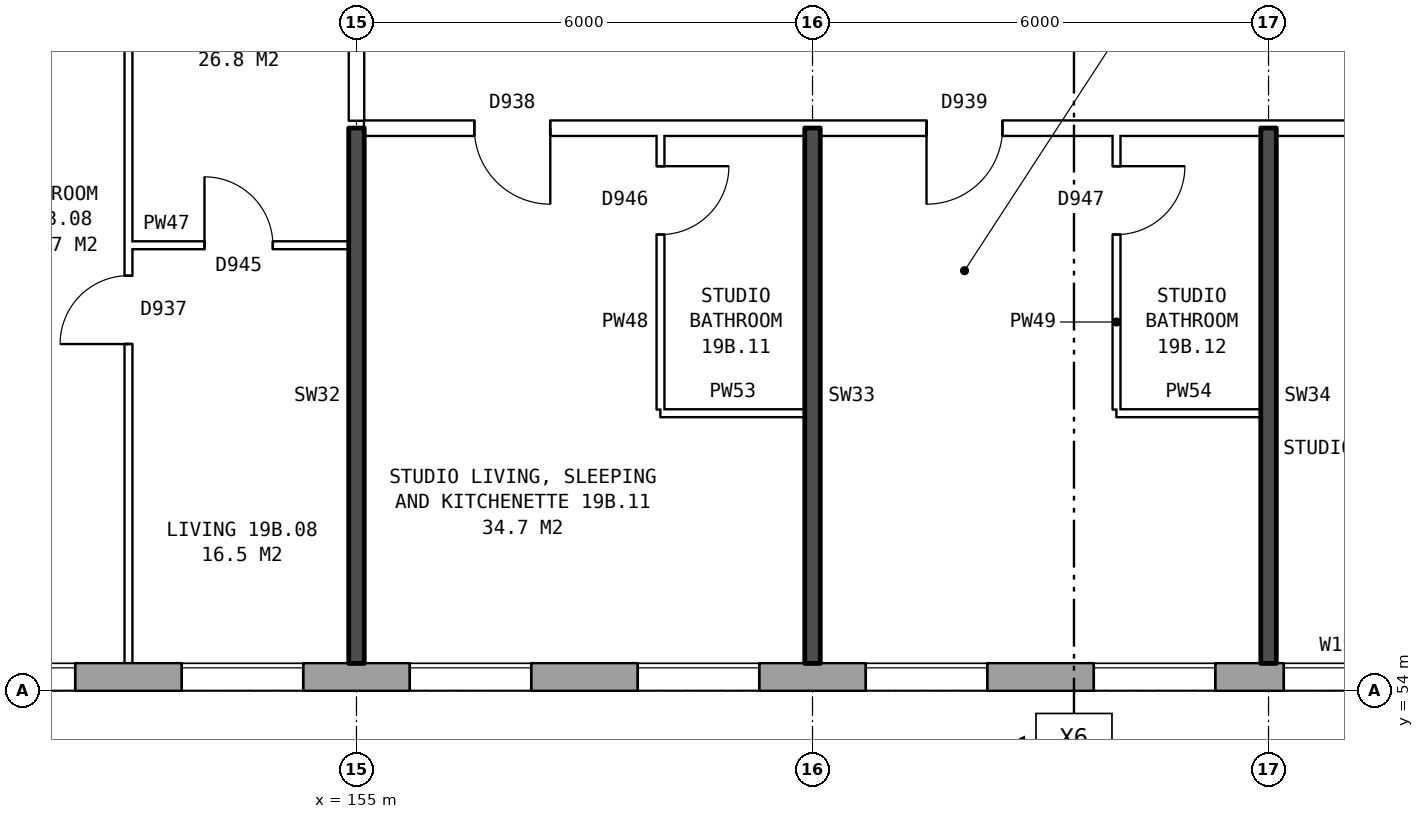
"""IFC4 building model, lengths in metres.
Left out: names, types, materials, properties, quantities, classifications, styles, units other than length and angle.
Written with IfcOpenShell. Run it as: python <this file> out.ifc"""

import sys

from ifc_helpers import new_model, si_unit, direction, frame, frame_2d, origin, place, context, subcontext, project, spatial, rectangle, extrude, element, fill, save


model = new_model("IFC4")
c1 = context("Model", 3, precision=1e-05, world=origin(), true_north=direction((0.0, 1.0)))
c2 = subcontext(c1, "Body", "Model", "MODEL_VIEW")
j1 = project(units=[si_unit("LENGTHUNIT", "METRE"), si_unit("PLANEANGLEUNIT", "RADIAN")], contexts=[c1])
p1 = place(None, origin())
s1 = spatial("IfcSite", under=j1, at=p1, CompositionType="ELEMENT")
p2 = place(p1, origin())
s2 = spatial("IfcBuilding", under=s1, at=p2, CompositionType="ELEMENT")
p3 = place(p2, frame((0.0, 0.0, 71.6)))
s3 = spatial("IfcBuildingStorey", under=s2, at=p3, CompositionType="ELEMENT", Elevation=71.6)
p4 = place(p3, frame((134.075, 54.18, 0.0), z_axis=(0.0, 0.0, 1.0), x_axis=(1.0, 0.0, 0.0)))
e1 = element("IfcWall", 1, at=p4, inside=s3, PredefinedType="STANDARD", context=c2, shape_type="SweptSolid", body=[
    extrude(rectangle(XDim=38.101, YDim=0.36, at=frame_2d((19.05, 0.0))), origin(), (0.0, 0.0, 1.0), 2.85),
])
p5 = place(p4, frame((0.3, 0.0, 0.8)))
e2 = element("IfcOpeningElement", 2, at=p5, cuts=e1, PredefinedType="OPENING", context=c2, shape_type="SweptSolid", body=[
    extrude(rectangle(XDim=1.0, YDim=1.8, at=frame_2d((0.5, 0.9))), frame((0.0, 0.19, 0.0), z_axis=(0.0, -1.0, 0.0), x_axis=(1.0, 0.0, 0.0)), (0.0, 0.0, 1.0), 0.38),
])
p6 = place(p4, frame((3.525, 0.0, 0.8)))
e3 = element("IfcOpeningElement", 3, at=p6, cuts=e1, PredefinedType="OPENING", context=c2, shape_type="SweptSolid", body=[
    extrude(rectangle(XDim=0.8, YDim=0.9, at=frame_2d((0.4, 0.45))), frame((0.0, 0.19, 0.0), z_axis=(0.0, -1.0, 0.0), x_axis=(1.0, 0.0, 0.0)), (0.0, 0.0, 1.0), 0.38),
])
p7 = place(p4, frame((6.625, 0.0, 0.8)))
e4 = element("IfcOpeningElement", 4, at=p7, cuts=e1, PredefinedType="OPENING", context=c2, shape_type="SweptSolid", body=[
    extrude(rectangle(XDim=1.6, YDim=1.8, at=frame_2d((0.8, 0.9))), frame((0.0, 0.19, 0.0), z_axis=(0.0, -1.0, 0.0), x_axis=(1.0, 0.0, 0.0)), (0.0, 0.0, 1.0), 0.38),
])
p8 = place(p4, frame((9.625, 0.0, 0.8)))
e5 = element("IfcOpeningElement", 5, at=p8, cuts=e1, PredefinedType="OPENING", context=c2, shape_type="SweptSolid", body=[
    extrude(rectangle(XDim=1.6, YDim=1.8, at=frame_2d((0.8, 0.9))), frame((0.0, 0.19, 0.0), z_axis=(0.0, -1.0, 0.0), x_axis=(1.0, 0.0, 0.0)), (0.0, 0.0, 1.0), 0.38),
])
p9 = place(p4, frame((12.625, 0.0, 0.8)))
e6 = element("IfcOpeningElement", 6, at=p9, cuts=e1, PredefinedType="OPENING", context=c2, shape_type="SweptSolid", body=[
    extrude(rectangle(XDim=1.6, YDim=1.8, at=frame_2d((0.8, 0.9))), frame((0.0, 0.19, 0.0), z_axis=(0.0, -1.0, 0.0), x_axis=(1.0, 0.0, 0.0)), (0.0, 0.0, 1.0), 0.38),
])
p10 = place(p4, frame((15.625, 0.0, 0.8)))
e7 = element("IfcOpeningElement", 7, at=p10, cuts=e1, PredefinedType="OPENING", context=c2, shape_type="SweptSolid", body=[
    extrude(rectangle(XDim=1.6, YDim=1.8, at=frame_2d((0.8, 0.9))), frame((0.0, 0.19, 0.0), z_axis=(0.0, -1.0, 0.0), x_axis=(1.0, 0.0, 0.0)), (0.0, 0.0, 1.0), 0.38),
])
p11 = place(p4, frame((18.625, 0.0, 0.8)))
e8 = element("IfcOpeningElement", 8, at=p11, cuts=e1, PredefinedType="OPENING", context=c2, shape_type="SweptSolid", body=[
    extrude(rectangle(XDim=1.6, YDim=1.8, at=frame_2d((0.8, 0.9))), frame((0.0, 0.19, 0.0), z_axis=(0.0, -1.0, 0.0), x_axis=(1.0, 0.0, 0.0)), (0.0, 0.0, 1.0), 0.38),
])
p12 = place(p4, frame((21.625, 0.0, 0.8)))
e9 = element("IfcOpeningElement", 9, at=p12, cuts=e1, PredefinedType="OPENING", context=c2, shape_type="SweptSolid", body=[
    extrude(rectangle(XDim=1.6, YDim=1.8, at=frame_2d((0.8, 0.9))), frame((0.0, 0.19, 0.0), z_axis=(0.0, -1.0, 0.0), x_axis=(1.0, 0.0, 0.0)), (0.0, 0.0, 1.0), 0.38),
])
p13 = place(p4, frame((24.625, 0.0, 0.8)))
e10 = element("IfcOpeningElement", 10, at=p13, cuts=e1, PredefinedType="OPENING", context=c2, shape_type="SweptSolid", body=[
    extrude(rectangle(XDim=1.6, YDim=1.8, at=frame_2d((0.8, 0.9))), frame((0.0, 0.19, 0.0), z_axis=(0.0, -1.0, 0.0), x_axis=(1.0, 0.0, 0.0)), (0.0, 0.0, 1.0), 0.38),
])
p14 = place(p4, frame((27.625, 0.0, 0.8)))
e11 = element("IfcOpeningElement", 11, at=p14, cuts=e1, PredefinedType="OPENING", context=c2, shape_type="SweptSolid", body=[
    extrude(rectangle(XDim=1.6, YDim=1.8, at=frame_2d((0.8, 0.9))), frame((0.0, 0.19, 0.0), z_axis=(0.0, -1.0, 0.0), x_axis=(1.0, 0.0, 0.0)), (0.0, 0.0, 1.0), 0.38),
])
p15 = place(p4, frame((30.625, 0.0, 0.8)))
e12 = element("IfcOpeningElement", 12, at=p15, cuts=e1, PredefinedType="OPENING", context=c2, shape_type="SweptSolid", body=[
    extrude(rectangle(XDim=1.6, YDim=1.8, at=frame_2d((0.8, 0.9))), frame((0.0, 0.19, 0.0), z_axis=(0.0, -1.0, 0.0), x_axis=(1.0, 0.0, 0.0)), (0.0, 0.0, 1.0), 0.38),
])
p16 = place(p4, frame((33.125, 0.0, 0.8)))
e13 = element("IfcOpeningElement", 13, at=p16, cuts=e1, PredefinedType="OPENING", context=c2, shape_type="SweptSolid", body=[
    extrude(rectangle(XDim=1.4, YDim=0.9, at=frame_2d((0.7, 0.45))), frame((0.0, 0.19, 0.0), z_axis=(0.0, -1.0, 0.0), x_axis=(1.0, 0.0, 0.0)), (0.0, 0.0, 1.0), 0.38),
])
p17 = place(p4, frame((1.6, 0.0, 1.6)))
e14 = element("IfcOpeningElement", 14, at=p17, cuts=e1, PredefinedType="OPENING", context=c2, shape_type="SweptSolid", body=[
    extrude(rectangle(XDim=0.6, YDim=0.9, at=frame_2d((0.3, 0.45))), frame((0.0, 0.19, 0.0), z_axis=(0.0, -1.0, 0.0), x_axis=(1.0, 0.0, 0.0)), (0.0, 0.0, 1.0), 0.38),
])
p18 = place(p4, frame((4.625, 0.0, 0.8)))
e15 = element("IfcOpeningElement", 15, at=p18, cuts=e1, PredefinedType="OPENING", context=c2, shape_type="SweptSolid", body=[
    extrude(rectangle(XDim=1.6, YDim=1.8, at=frame_2d((0.8, 0.9))), frame((0.0, 0.19, 0.0), z_axis=(0.0, -1.0, 0.0), x_axis=(1.0, 0.0, 0.0)), (0.0, 0.0, 1.0), 0.38),
])
p19 = place(p4, frame((35.775, 0.0, 1.7)))
e16 = element("IfcOpeningElement", 16, at=p19, cuts=e1, PredefinedType="OPENING", context=c2, shape_type="SweptSolid", body=[
    extrude(rectangle(XDim=0.6, YDim=0.9, at=frame_2d((0.3, 0.45))), frame((0.0, 0.19, 0.0), z_axis=(0.0, -1.0, 0.0), x_axis=(1.0, 0.0, 0.0)), (0.0, 0.0, 1.0), 0.38),
])
p20 = place(p4, frame((36.675, 0.0, 0.8)))
e17 = element("IfcOpeningElement", 17, at=p20, cuts=e1, PredefinedType="OPENING", context=c2, shape_type="SweptSolid", body=[
    extrude(rectangle(XDim=1.0, YDim=1.8, at=frame_2d((0.5, 0.9))), frame((0.0, 0.19, 0.0), z_axis=(0.0, -1.0, 0.0), x_axis=(1.0, 0.0, 0.0)), (0.0, 0.0, 1.0), 0.38),
])
for number, where, z_axis, x_axis in (
    (18, (159.0, 57.65, 0.0), (0.0, 0.0, 1.0), (1.0, 0.0, 0.0)),
    (19, (165.0, 57.65, 0.0), (0.0, 0.0, 1.0), (1.0, 0.0, 0.0)),
):
    element("IfcWall", number, at=place(p3, frame(where, z_axis=z_axis, x_axis=x_axis)), inside=s3, PredefinedType="PARTITIONING", context=c2, shape_type="SweptSolid", body=[
        extrude(rectangle(XDim=1.9, YDim=0.1, at=frame_2d((0.95, 0.0))), origin(), (0.0, 0.0, 1.0), 2.85),
    ])
p21 = place(p3, frame((152.0, 59.86, 0.0), z_axis=(0.0, 0.0, 1.0), x_axis=(1.0, 0.0, 0.0)))
e20 = element("IfcWall", 20, at=p21, inside=s3, PredefinedType="PARTITIONING", context=c2, shape_type="SweptSolid", body=[
    extrude(rectangle(XDim=2.9, YDim=0.1, at=frame_2d((1.45, 0.0))), origin(), (0.0, 0.0, 1.0), 2.85),
])
p22 = place(p21, frame((1.0, 0.0, 0.0)))
e21 = element("IfcOpeningElement", 21, at=p22, cuts=e20, PredefinedType="OPENING", context=c2, shape_type="SweptSolid", body=[
    extrude(rectangle(XDim=0.9, YDim=2.1, at=frame_2d((0.45, 1.05))), frame((0.0, 0.06, 0.0), z_axis=(0.0, -1.0, 0.0), x_axis=(1.0, 0.0, 0.0)), (0.0, 0.0, 1.0), 0.12),
])
p23 = place(p3, frame((155.1, 61.4, 0.0), z_axis=(0.0, 0.0, 1.0), x_axis=(1.0, 0.0, 0.0)))
e22 = element("IfcWall", 22, at=p23, inside=s3, PredefinedType="PARTITIONING", context=c2, shape_type="SweptSolid", body=[
    extrude(rectangle(XDim=19.79, YDim=0.2, at=frame_2d((9.895, 0.0))), origin(), (0.0, 0.0, 1.0), 2.85),
])
p24 = place(p23, frame((1.45, 0.0, 0.0)))
e23 = element("IfcOpeningElement", 23, at=p24, cuts=e22, PredefinedType="OPENING", context=c2, shape_type="SweptSolid", body=[
    extrude(rectangle(XDim=1.0, YDim=2.1, at=frame_2d((0.5, 1.05))), frame((0.0, 0.11, 0.0), z_axis=(0.0, -1.0, 0.0), x_axis=(1.0, 0.0, 0.0)), (0.0, 0.0, 1.0), 0.22),
])
p25 = place(p23, frame((7.4, 0.0, 0.0)))
e24 = element("IfcOpeningElement", 24, at=p25, cuts=e22, PredefinedType="OPENING", context=c2, shape_type="SweptSolid", body=[
    extrude(rectangle(XDim=1.0, YDim=2.1, at=frame_2d((0.5, 1.05))), frame((0.0, 0.11, 0.0), z_axis=(0.0, -1.0, 0.0), x_axis=(1.0, 0.0, 0.0)), (0.0, 0.0, 1.0), 0.22),
])
p26 = place(p23, frame((13.2, 0.0, 0.0)))
e25 = element("IfcOpeningElement", 25, at=p26, cuts=e22, PredefinedType="OPENING", context=c2, shape_type="SweptSolid", body=[
    extrude(rectangle(XDim=1.0, YDim=2.1, at=frame_2d((0.5, 1.05))), frame((0.0, 0.11, 0.0), z_axis=(0.0, -1.0, 0.0), x_axis=(1.0, 0.0, 0.0)), (0.0, 0.0, 1.0), 0.22),
])
p27 = place(p3, frame((152.0, 54.36, 0.0), z_axis=(0.0, 0.0, 1.0), x_axis=(0.0, 1.0, 0.0)))
e26 = element("IfcWall", 26, at=p27, inside=s3, PredefinedType="PARTITIONING", context=c2, shape_type="SweptSolid", body=[
    extrude(rectangle(XDim=14.34, YDim=0.1, at=frame_2d((7.17, 0.0))), origin(), (0.0, 0.0, 1.0), 2.85),
])
p28 = place(p27, frame((4.2, 0.0, 0.0)))
e27 = element("IfcOpeningElement", 27, at=p28, cuts=e26, PredefinedType="OPENING", context=c2, shape_type="SweptSolid", body=[
    extrude(rectangle(XDim=0.9, YDim=2.1, at=frame_2d((0.45, 1.05))), frame((0.0, 0.06, 0.0), z_axis=(0.0, -1.0, 0.0), x_axis=(1.0, 0.0, 0.0)), (0.0, 0.0, 1.0), 0.12),
])
p29 = place(p27, frame((13.04, 0.0, 0.0)))
e28 = element("IfcOpeningElement", 28, at=p29, cuts=e26, PredefinedType="OPENING", context=c2, shape_type="SweptSolid", body=[
    extrude(rectangle(XDim=0.9, YDim=2.1, at=frame_2d((0.45, 1.05))), frame((0.0, 0.06, 0.0), z_axis=(0.0, -1.0, 0.0), x_axis=(1.0, 0.0, 0.0)), (0.0, 0.0, 1.0), 0.12),
])
p30 = place(p3, frame((155.0, 54.36, 0.0), z_axis=(0.0, 0.0, 1.0), x_axis=(0.0, 1.0, 0.0)))
e29 = element("IfcWall", 29, at=p30, inside=s3, PredefinedType="SOLIDWALL", context=c2, shape_type="SweptSolid", body=[
    extrude(rectangle(XDim=7.04, YDim=0.2, at=frame_2d((3.52, 0.0))), origin(), (0.0, 0.0, 1.0), 2.85),
])
p31 = place(p3, frame((155.0, 61.5, 0.0), z_axis=(0.0, 0.0, 1.0), x_axis=(0.0, 1.0, 0.0)))
e30 = element("IfcWall", 30, at=p31, inside=s3, PredefinedType="PARTITIONING", context=c2, shape_type="SweptSolid", body=[
    extrude(rectangle(XDim=2.2, YDim=0.2, at=frame_2d((1.1, 0.0))), origin(), (0.0, 0.0, 1.0), 2.85),
])
p32 = place(p3, frame((159.0, 57.7, 0.0), z_axis=(0.0, 0.0, 1.0), x_axis=(0.0, 1.0, 0.0)))
e31 = element("IfcWall", 31, at=p32, inside=s3, PredefinedType="PARTITIONING", context=c2, shape_type="SweptSolid", body=[
    extrude(rectangle(XDim=3.6, YDim=0.1, at=frame_2d((1.8, 0.0))), origin(), (0.0, 0.0, 1.0), 2.85),
])
p33 = place(p32, frame((2.3, 0.0, 0.0)))
e32 = element("IfcOpeningElement", 32, at=p33, cuts=e31, PredefinedType="OPENING", context=c2, shape_type="SweptSolid", body=[
    extrude(rectangle(XDim=0.9, YDim=2.1, at=frame_2d((0.45, 1.05))), frame((0.0, 0.06, 0.0), z_axis=(0.0, -1.0, 0.0), x_axis=(1.0, 0.0, 0.0)), (0.0, 0.0, 1.0), 0.12),
])
p34 = place(p3, frame((161.0, 54.36, 0.0), z_axis=(0.0, 0.0, 1.0), x_axis=(0.0, 1.0, 0.0)))
e33 = element("IfcWall", 33, at=p34, inside=s3, PredefinedType="SOLIDWALL", context=c2, shape_type="SweptSolid", body=[
    extrude(rectangle(XDim=7.04, YDim=0.2, at=frame_2d((3.52, 0.0))), origin(), (0.0, 0.0, 1.0), 2.85),
])
p35 = place(p3, frame((165.0, 57.7, 0.0), z_axis=(0.0, 0.0, 1.0), x_axis=(0.0, 1.0, 0.0)))
e34 = element("IfcWall", 34, at=p35, inside=s3, PredefinedType="PARTITIONING", context=c2, shape_type="SweptSolid", body=[
    extrude(rectangle(XDim=3.6, YDim=0.1, at=frame_2d((1.8, 0.0))), origin(), (0.0, 0.0, 1.0), 2.85),
])
p36 = place(p35, frame((2.3, 0.0, 0.0)))
e35 = element("IfcOpeningElement", 35, at=p36, cuts=e34, PredefinedType="OPENING", context=c2, shape_type="SweptSolid", body=[
    extrude(rectangle(XDim=0.9, YDim=2.1, at=frame_2d((0.45, 1.05))), frame((0.0, 0.06, 0.0), z_axis=(0.0, -1.0, 0.0), x_axis=(1.0, 0.0, 0.0)), (0.0, 0.0, 1.0), 0.12),
])
p37 = place(p3, frame((167.0, 54.36, 0.0), z_axis=(0.0, 0.0, 1.0), x_axis=(0.0, 1.0, 0.0)))
e36 = element("IfcWall", 36, at=p37, inside=s3, PredefinedType="SOLIDWALL", context=c2, shape_type="SweptSolid", body=[
    extrude(rectangle(XDim=7.04, YDim=0.2, at=frame_2d((3.52, 0.0))), origin(), (0.0, 0.0, 1.0), 2.85),
])
p38 = place(p10, origin())
e37 = element("IfcWindow", 37, at=p38, inside=s3, PartitioningType="SINGLE_PANEL", PredefinedType="WINDOW", context=c2, shape_type="SweptSolid", body=[
    extrude(rectangle(XDim=1.6, YDim=1.8, at=frame_2d((0.8, 0.9))), frame((0.0, 0.15, 0.0), z_axis=(0.0, -1.0, 0.0), x_axis=(1.0, 0.0, 0.0)), (0.0, 0.0, 1.0), 0.06),
])
fill(e7, e37)
p39 = place(p11, origin())
e38 = element("IfcWindow", 38, at=p39, inside=s3, PartitioningType="SINGLE_PANEL", PredefinedType="WINDOW", context=c2, shape_type="SweptSolid", body=[
    extrude(rectangle(XDim=1.6, YDim=1.8, at=frame_2d((0.8, 0.9))), frame((0.0, 0.15, 0.0), z_axis=(0.0, -1.0, 0.0), x_axis=(1.0, 0.0, 0.0)), (0.0, 0.0, 1.0), 0.06),
])
fill(e8, e38)
p40 = place(p12, origin())
e39 = element("IfcWindow", 39, at=p40, inside=s3, PartitioningType="SINGLE_PANEL", PredefinedType="WINDOW", context=c2, shape_type="SweptSolid", body=[
    extrude(rectangle(XDim=1.6, YDim=1.8, at=frame_2d((0.8, 0.9))), frame((0.0, 0.15, 0.0), z_axis=(0.0, -1.0, 0.0), x_axis=(1.0, 0.0, 0.0)), (0.0, 0.0, 1.0), 0.06),
])
fill(e9, e39)
p41 = place(p13, origin())
e40 = element("IfcWindow", 40, at=p41, inside=s3, PartitioningType="SINGLE_PANEL", PredefinedType="WINDOW", context=c2, shape_type="SweptSolid", body=[
    extrude(rectangle(XDim=1.6, YDim=1.8, at=frame_2d((0.8, 0.9))), frame((0.0, 0.15, 0.0), z_axis=(0.0, -1.0, 0.0), x_axis=(1.0, 0.0, 0.0)), (0.0, 0.0, 1.0), 0.06),
])
fill(e10, e40)
p42 = place(p14, origin())
e41 = element("IfcWindow", 41, at=p42, inside=s3, PartitioningType="SINGLE_PANEL", PredefinedType="WINDOW", context=c2, shape_type="SweptSolid", body=[
    extrude(rectangle(XDim=1.6, YDim=1.8, at=frame_2d((0.8, 0.9))), frame((0.0, 0.15, 0.0), z_axis=(0.0, -1.0, 0.0), x_axis=(1.0, 0.0, 0.0)), (0.0, 0.0, 1.0), 0.06),
])
fill(e11, e41)
p43 = place(p15, origin())
e42 = element("IfcWindow", 42, at=p43, inside=s3, PartitioningType="SINGLE_PANEL", PredefinedType="WINDOW", context=c2, shape_type="SweptSolid", body=[
    extrude(rectangle(XDim=1.6, YDim=1.8, at=frame_2d((0.8, 0.9))), frame((0.0, 0.15, 0.0), z_axis=(0.0, -1.0, 0.0), x_axis=(1.0, 0.0, 0.0)), (0.0, 0.0, 1.0), 0.06),
])
fill(e12, e42)
p44 = place(p16, origin())
e43 = element("IfcWindow", 43, at=p44, inside=s3, PartitioningType="SINGLE_PANEL", PredefinedType="WINDOW", context=c2, shape_type="SweptSolid", body=[
    extrude(rectangle(XDim=1.4, YDim=0.9, at=frame_2d((0.7, 0.45))), frame((0.0, 0.15, 0.0), z_axis=(0.0, -1.0, 0.0), x_axis=(1.0, 0.0, 0.0)), (0.0, 0.0, 1.0), 0.06),
])
fill(e13, e43)
p45 = place(p28, origin())
e44 = element("IfcDoor", 44, at=p45, inside=s3, OperationType="SINGLE_SWING_LEFT", PredefinedType="DOOR", context=c2, shape_type="SweptSolid", body=[
    extrude(rectangle(XDim=0.9, YDim=2.1, at=frame_2d((0.45, 1.05))), frame((0.0, 0.025, 0.0), z_axis=(0.0, -1.0, 0.0), x_axis=(1.0, 0.0, 0.0)), (0.0, 0.0, 1.0), 0.05),
])
fill(e27, e44)
p46 = place(p22, origin())
e45 = element("IfcDoor", 45, at=p46, inside=s3, OperationType="SINGLE_SWING_LEFT", PredefinedType="DOOR", context=c2, shape_type="SweptSolid", body=[
    extrude(rectangle(XDim=0.9, YDim=2.1, at=frame_2d((0.45, 1.05))), frame((0.0, 0.025, 0.0), z_axis=(0.0, -1.0, 0.0), x_axis=(1.0, 0.0, 0.0)), (0.0, 0.0, 1.0), 0.05),
])
fill(e21, e45)
p47 = place(p24, frame((1.0, 0.0, 0.0), z_axis=(0.0, 0.0, 1.0), x_axis=(-1.0, 0.0, 0.0)))
e46 = element("IfcDoor", 46, at=p47, inside=s3, OperationType="SINGLE_SWING_LEFT", PredefinedType="DOOR", context=c2, shape_type="SweptSolid", body=[
    extrude(rectangle(XDim=1.0, YDim=2.1, at=frame_2d((0.5, 1.05))), frame((0.0, 0.025, 0.0), z_axis=(0.0, -1.0, 0.0), x_axis=(1.0, 0.0, 0.0)), (0.0, 0.0, 1.0), 0.05),
])
fill(e23, e46)
p48 = place(p33, frame((0.9, 0.0, 0.0), z_axis=(0.0, 0.0, 1.0), x_axis=(-1.0, 0.0, 0.0)))
e47 = element("IfcDoor", 47, at=p48, inside=s3, OperationType="SINGLE_SWING_LEFT", PredefinedType="DOOR", context=c2, shape_type="SweptSolid", body=[
    extrude(rectangle(XDim=0.9, YDim=2.1, at=frame_2d((0.45, 1.05))), frame((0.0, 0.025, 0.0), z_axis=(0.0, -1.0, 0.0), x_axis=(1.0, 0.0, 0.0)), (0.0, 0.0, 1.0), 0.05),
])
fill(e32, e47)
p49 = place(p25, frame((1.0, 0.0, 0.0), z_axis=(0.0, 0.0, 1.0), x_axis=(-1.0, 0.0, 0.0)))
e48 = element("IfcDoor", 48, at=p49, inside=s3, OperationType="SINGLE_SWING_RIGHT", PredefinedType="DOOR", context=c2, shape_type="SweptSolid", body=[
    extrude(rectangle(XDim=1.0, YDim=2.1, at=frame_2d((0.5, 1.05))), frame((0.0, 0.025, 0.0), z_axis=(0.0, -1.0, 0.0), x_axis=(1.0, 0.0, 0.0)), (0.0, 0.0, 1.0), 0.05),
])
fill(e24, e48)
p50 = place(p36, frame((0.9, 0.0, 0.0), z_axis=(0.0, 0.0, 1.0), x_axis=(-1.0, 0.0, 0.0)))
e49 = element("IfcDoor", 49, at=p50, inside=s3, OperationType="SINGLE_SWING_LEFT", PredefinedType="DOOR", context=c2, shape_type="SweptSolid", body=[
    extrude(rectangle(XDim=0.9, YDim=2.1, at=frame_2d((0.45, 1.05))), frame((0.0, 0.025, 0.0), z_axis=(0.0, -1.0, 0.0), x_axis=(1.0, 0.0, 0.0)), (0.0, 0.0, 1.0), 0.05),
])
fill(e35, e49)
save(model, sys.argv[1])
